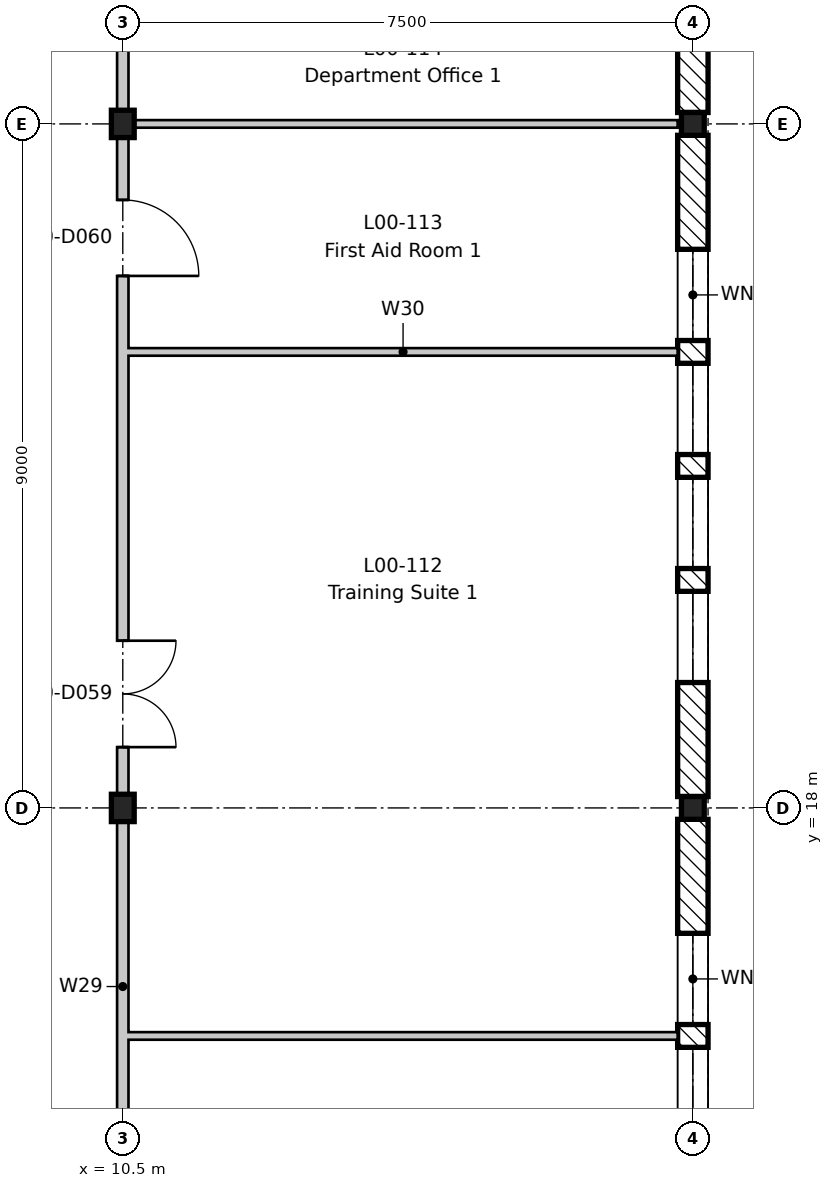
"""IFC4 building model, lengths in metres.
Left out: names, types, materials, properties, quantities, classifications, styles, units other than length and angle.
Written with IfcOpenShell. Run it as: python <this file> out.ifc"""

import sys

from ifc_helpers import new_model, si_unit, direction, frame, frame_2d, origin, origin_2d, place, context, subcontext, project, spatial, rectangle, i_section, extrude, element, fill, save


model = new_model("IFC4")
c1 = context("Model", 3, precision=1e-05, world=origin(), true_north=direction((0.0, 1.0)))
c2 = subcontext(c1, "Body", "Model", "MODEL_VIEW")
j1 = project(units=[si_unit("LENGTHUNIT", "METRE"), si_unit("PLANEANGLEUNIT", "RADIAN")], contexts=[c1])
p1 = place(None, origin())
s1 = spatial("IfcSite", under=j1, at=p1, CompositionType="ELEMENT")
p2 = place(p1, origin())
s2 = spatial("IfcBuilding", under=s1, at=p2, CompositionType="ELEMENT")
p3 = place(p2, origin())
s3 = spatial("IfcBuildingStorey", under=s2, at=p3, CompositionType="ELEMENT", Elevation=0.0)
for number, where, z_axis, x_axis in (
    (1, (10.5, 18.0, -0.6), (0.0, 0.0, 1.0), (1.0, 0.0, 0.0)),
    (2, (10.5, 27.0, -0.6), (0.0, 0.0, 1.0), (1.0, 0.0, 0.0)),
):
    element("IfcColumn", number, at=place(p3, frame(where, z_axis=z_axis, x_axis=x_axis)), inside=s3, PredefinedType="COLUMN", context=c2, shape_type="SweptSolid", body=[
        extrude(i_section(OverallWidth=0.3, OverallDepth=0.36, WebThickness=0.012, FlangeThickness=0.022, FilletRadius=0.027, at=origin_2d()), origin(), (0.0, 0.0, 1.0), 5.8),
    ])
for number, where, z_axis, x_axis in (
    (3, (18.0, 18.0, -0.6), (0.0, 0.0, 1.0), (1.0, 0.0, 0.0)),
    (4, (18.0, 27.0, -0.6), (0.0, 0.0, 1.0), (1.0, 0.0, 0.0)),
):
    element("IfcColumn", number, at=place(p3, frame(where, z_axis=z_axis, x_axis=x_axis)), inside=s3, PredefinedType="COLUMN", context=c2, shape_type="SweptSolid", body=[
        extrude(i_section(OverallWidth=0.3, OverallDepth=0.3, WebThickness=0.011, FlangeThickness=0.019, FilletRadius=0.027, at=origin_2d()), origin(), (0.0, 0.0, 1.0), 5.8),
    ])
p4 = place(p3, frame((18.0, 17.85, 0.0), z_axis=(0.0, 0.0, 1.0), x_axis=(0.0, -1.0, 0.0)))
e5 = element("IfcWall", 5, at=p4, inside=s3, PredefinedType="STANDARD", context=c2, shape_type="SweptSolid", body=[
    extrude(rectangle(XDim=8.7, YDim=0.4, at=frame_2d((4.35, 0.0))), origin(), (0.0, 0.0, 1.0), 4.8),
])
p5 = place(p4, frame((6.0, 0.0, 0.6)))
e6 = element("IfcOpeningElement", 6, at=p5, cuts=e5, PredefinedType="OPENING", context=c2, shape_type="SweptSolid", body=[
    extrude(rectangle(XDim=1.2, YDim=3.9, at=frame_2d((0.6, 1.95))), frame((0.0, 0.21, 0.0), z_axis=(0.0, -1.0, 0.0), x_axis=(1.0, 0.0, 0.0)), (0.0, 0.0, 1.0), 0.42),
])
p6 = place(p4, frame((4.5, 0.0, 0.6)))
e7 = element("IfcOpeningElement", 7, at=p6, cuts=e5, PredefinedType="OPENING", context=c2, shape_type="SweptSolid", body=[
    extrude(rectangle(XDim=1.2, YDim=3.9, at=frame_2d((0.6, 1.95))), frame((0.0, 0.21, 0.0), z_axis=(0.0, -1.0, 0.0), x_axis=(1.0, 0.0, 0.0)), (0.0, 0.0, 1.0), 0.42),
])
p7 = place(p4, frame((3.0, 0.0, 0.6)))
e8 = element("IfcOpeningElement", 8, at=p7, cuts=e5, PredefinedType="OPENING", context=c2, shape_type="SweptSolid", body=[
    extrude(rectangle(XDim=1.2, YDim=3.9, at=frame_2d((0.6, 1.95))), frame((0.0, 0.21, 0.0), z_axis=(0.0, -1.0, 0.0), x_axis=(1.0, 0.0, 0.0)), (0.0, 0.0, 1.0), 0.42),
])
p8 = place(p4, frame((1.5, 0.0, 0.6)))
e9 = element("IfcOpeningElement", 9, at=p8, cuts=e5, PredefinedType="OPENING", context=c2, shape_type="SweptSolid", body=[
    extrude(rectangle(XDim=1.2, YDim=3.9, at=frame_2d((0.6, 1.95))), frame((0.0, 0.21, 0.0), z_axis=(0.0, -1.0, 0.0), x_axis=(1.0, 0.0, 0.0)), (0.0, 0.0, 1.0), 0.42),
])
p9 = place(p3, frame((18.0, 26.85, 0.0), z_axis=(0.0, 0.0, 1.0), x_axis=(0.0, -1.0, 0.0)))
e10 = element("IfcWall", 10, at=p9, inside=s3, PredefinedType="STANDARD", context=c2, shape_type="SweptSolid", body=[
    extrude(rectangle(XDim=8.7, YDim=0.4, at=frame_2d((4.35, 0.0))), origin(), (0.0, 0.0, 1.0), 4.8),
])
p10 = place(p9, frame((6.0, 0.0, 0.6)))
e11 = element("IfcOpeningElement", 11, at=p10, cuts=e10, PredefinedType="OPENING", context=c2, shape_type="SweptSolid", body=[
    extrude(rectangle(XDim=1.2, YDim=3.9, at=frame_2d((0.6, 1.95))), frame((0.0, 0.21, 0.0), z_axis=(0.0, -1.0, 0.0), x_axis=(1.0, 0.0, 0.0)), (0.0, 0.0, 1.0), 0.42),
])
p11 = place(p9, frame((4.5, 0.0, 0.6)))
e12 = element("IfcOpeningElement", 12, at=p11, cuts=e10, PredefinedType="OPENING", context=c2, shape_type="SweptSolid", body=[
    extrude(rectangle(XDim=1.2, YDim=3.9, at=frame_2d((0.6, 1.95))), frame((0.0, 0.21, 0.0), z_axis=(0.0, -1.0, 0.0), x_axis=(1.0, 0.0, 0.0)), (0.0, 0.0, 1.0), 0.42),
])
p12 = place(p9, frame((3.0, 0.0, 0.6)))
e13 = element("IfcOpeningElement", 13, at=p12, cuts=e10, PredefinedType="OPENING", context=c2, shape_type="SweptSolid", body=[
    extrude(rectangle(XDim=1.2, YDim=3.9, at=frame_2d((0.6, 1.95))), frame((0.0, 0.21, 0.0), z_axis=(0.0, -1.0, 0.0), x_axis=(1.0, 0.0, 0.0)), (0.0, 0.0, 1.0), 0.42),
])
p13 = place(p9, frame((1.5, 0.0, 0.6)))
e14 = element("IfcOpeningElement", 14, at=p13, cuts=e10, PredefinedType="OPENING", context=c2, shape_type="SweptSolid", body=[
    extrude(rectangle(XDim=1.2, YDim=3.9, at=frame_2d((0.6, 1.95))), frame((0.0, 0.21, 0.0), z_axis=(0.0, -1.0, 0.0), x_axis=(1.0, 0.0, 0.0)), (0.0, 0.0, 1.0), 0.42),
])
p14 = place(p3, frame((18.0, 35.85, 0.0), z_axis=(0.0, 0.0, 1.0), x_axis=(0.0, -1.0, 0.0)))
e15 = element("IfcWall", 15, at=p14, inside=s3, PredefinedType="STANDARD", context=c2, shape_type="SweptSolid", body=[
    extrude(rectangle(XDim=8.7, YDim=0.4, at=frame_2d((4.35, 0.0))), origin(), (0.0, 0.0, 1.0), 4.8),
])
for number, where, z_axis, x_axis in (
    (16, (10.575, 15.0, 0.0), (0.0, 0.0, 1.0), (1.0, 0.0, 0.0)),
    (17, (10.575, 24.0, 0.0), (0.0, 0.0, 1.0), (1.0, 0.0, 0.0)),
):
    element("IfcWall", number, at=place(p3, frame(where, z_axis=z_axis, x_axis=x_axis)), inside=s3, PredefinedType="PARTITIONING", context=c2, shape_type="SweptSolid", body=[
        extrude(rectangle(XDim=7.225, YDim=0.1, at=frame_2d((3.613, 0.0))), origin(), (0.0, 0.0, 1.0), 5.2),
    ])
p15 = place(p3, frame((10.575, 27.0, 0.0), z_axis=(0.0, 0.0, 1.0), x_axis=(1.0, 0.0, 0.0)))
e18 = element("IfcWall", 18, at=p15, inside=s3, PredefinedType="PARTITIONING", context=c2, shape_type="SweptSolid", body=[
    extrude(rectangle(XDim=7.225, YDim=0.1, at=frame_2d((3.613, 0.0))), origin(), (0.0, 0.0, 1.0), 4.85),
])
p16 = place(p3, frame((10.5, 0.0, 0.0), z_axis=(0.0, 0.0, 1.0), x_axis=(0.0, 1.0, 0.0)))
e19 = element("IfcWall", 19, at=p16, inside=s3, PredefinedType="PARTITIONING", context=c2, shape_type="SweptSolid", body=[
    extrude(rectangle(XDim=70.5, YDim=0.15, at=frame_2d((35.25, 0.0))), origin(), (0.0, 0.0, 1.0), 4.68),
])
p17 = place(p16, frame((1.0, 0.0, 0.0)))
e20 = element("IfcOpeningElement", 20, at=p17, cuts=e19, PredefinedType="OPENING", context=c2, shape_type="SweptSolid", body=[
    extrude(rectangle(XDim=1.0, YDim=2.1, at=frame_2d((0.5, 1.05))), frame((0.0, 0.085, 0.0), z_axis=(0.0, -1.0, 0.0), x_axis=(1.0, 0.0, 0.0)), (0.0, 0.0, 1.0), 0.17),
])
p18 = place(p16, frame((5.5, 0.0, 0.0)))
e21 = element("IfcOpeningElement", 21, at=p18, cuts=e19, PredefinedType="OPENING", context=c2, shape_type="SweptSolid", body=[
    extrude(rectangle(XDim=1.0, YDim=2.1, at=frame_2d((0.5, 1.05))), frame((0.0, 0.085, 0.0), z_axis=(0.0, -1.0, 0.0), x_axis=(1.0, 0.0, 0.0)), (0.0, 0.0, 1.0), 0.17),
])
p19 = place(p16, frame((11.5, 0.0, 0.0)))
e22 = element("IfcOpeningElement", 22, at=p19, cuts=e19, PredefinedType="OPENING", context=c2, shape_type="SweptSolid", body=[
    extrude(rectangle(XDim=1.0, YDim=2.1, at=frame_2d((0.5, 1.05))), frame((0.0, 0.085, 0.0), z_axis=(0.0, -1.0, 0.0), x_axis=(1.0, 0.0, 0.0)), (0.0, 0.0, 1.0), 0.17),
])
p20 = place(p16, frame((18.8, 0.0, 0.0)))
e23 = element("IfcOpeningElement", 23, at=p20, cuts=e19, PredefinedType="OPENING", context=c2, shape_type="SweptSolid", body=[
    extrude(rectangle(XDim=1.4, YDim=2.1, at=frame_2d((0.7, 1.05))), frame((0.0, 0.085, 0.0), z_axis=(0.0, -1.0, 0.0), x_axis=(1.0, 0.0, 0.0)), (0.0, 0.0, 1.0), 0.17),
])
p21 = place(p16, frame((25.0, 0.0, 0.0)))
e24 = element("IfcOpeningElement", 24, at=p21, cuts=e19, PredefinedType="OPENING", context=c2, shape_type="SweptSolid", body=[
    extrude(rectangle(XDim=1.0, YDim=2.1, at=frame_2d((0.5, 1.05))), frame((0.0, 0.085, 0.0), z_axis=(0.0, -1.0, 0.0), x_axis=(1.0, 0.0, 0.0)), (0.0, 0.0, 1.0), 0.17),
])
p22 = place(p16, frame((28.0, 0.0, 0.0)))
e25 = element("IfcOpeningElement", 25, at=p22, cuts=e19, PredefinedType="OPENING", context=c2, shape_type="SweptSolid", body=[
    extrude(rectangle(XDim=1.0, YDim=2.1, at=frame_2d((0.5, 1.05))), frame((0.0, 0.085, 0.0), z_axis=(0.0, -1.0, 0.0), x_axis=(1.0, 0.0, 0.0)), (0.0, 0.0, 1.0), 0.17),
])
p23 = place(p16, frame((33.8, 0.0, 0.0)))
e26 = element("IfcOpeningElement", 26, at=p23, cuts=e19, PredefinedType="OPENING", context=c2, shape_type="SweptSolid", body=[
    extrude(rectangle(XDim=1.4, YDim=2.1, at=frame_2d((0.7, 1.05))), frame((0.0, 0.085, 0.0), z_axis=(0.0, -1.0, 0.0), x_axis=(1.0, 0.0, 0.0)), (0.0, 0.0, 1.0), 0.17),
])
p24 = place(p16, frame((41.5, 0.0, 0.0)))
e27 = element("IfcOpeningElement", 27, at=p24, cuts=e19, PredefinedType="OPENING", context=c2, shape_type="SweptSolid", body=[
    extrude(rectangle(XDim=1.0, YDim=2.1, at=frame_2d((0.5, 1.05))), frame((0.0, 0.085, 0.0), z_axis=(0.0, -1.0, 0.0), x_axis=(1.0, 0.0, 0.0)), (0.0, 0.0, 1.0), 0.17),
])
p25 = place(p16, frame((46.0, 0.0, 0.0)))
e28 = element("IfcOpeningElement", 28, at=p25, cuts=e19, PredefinedType="OPENING", context=c2, shape_type="SweptSolid", body=[
    extrude(rectangle(XDim=1.0, YDim=2.1, at=frame_2d((0.5, 1.05))), frame((0.0, 0.085, 0.0), z_axis=(0.0, -1.0, 0.0), x_axis=(1.0, 0.0, 0.0)), (0.0, 0.0, 1.0), 0.17),
])
p26 = place(p16, frame((49.0, 0.0, 0.0)))
e29 = element("IfcOpeningElement", 29, at=p26, cuts=e19, PredefinedType="OPENING", context=c2, shape_type="SweptSolid", body=[
    extrude(rectangle(XDim=1.0, YDim=2.1, at=frame_2d((0.5, 1.05))), frame((0.0, 0.085, 0.0), z_axis=(0.0, -1.0, 0.0), x_axis=(1.0, 0.0, 0.0)), (0.0, 0.0, 1.0), 0.17),
])
p27 = place(p16, frame((54.75, 0.0, 0.0)))
e30 = element("IfcOpeningElement", 30, at=p27, cuts=e19, PredefinedType="OPENING", context=c2, shape_type="SweptSolid", body=[
    extrude(rectangle(XDim=1.0, YDim=2.1, at=frame_2d((0.5, 1.05))), frame((0.0, 0.085, 0.0), z_axis=(0.0, -1.0, 0.0), x_axis=(1.0, 0.0, 0.0)), (0.0, 0.0, 1.0), 0.17),
])
p28 = place(p16, frame((58.0, 0.0, 0.0)))
e31 = element("IfcOpeningElement", 31, at=p28, cuts=e19, PredefinedType="OPENING", context=c2, shape_type="SweptSolid", body=[
    extrude(rectangle(XDim=1.0, YDim=2.1, at=frame_2d((0.5, 1.05))), frame((0.0, 0.085, 0.0), z_axis=(0.0, -1.0, 0.0), x_axis=(1.0, 0.0, 0.0)), (0.0, 0.0, 1.0), 0.17),
])
p29 = place(p16, frame((61.0, 0.0, 0.0)))
e32 = element("IfcOpeningElement", 32, at=p29, cuts=e19, PredefinedType="OPENING", context=c2, shape_type="SweptSolid", body=[
    extrude(rectangle(XDim=1.0, YDim=2.1, at=frame_2d((0.5, 1.05))), frame((0.0, 0.085, 0.0), z_axis=(0.0, -1.0, 0.0), x_axis=(1.0, 0.0, 0.0)), (0.0, 0.0, 1.0), 0.17),
])
p30 = place(p16, frame((64.0, 0.0, 0.0)))
e33 = element("IfcOpeningElement", 33, at=p30, cuts=e19, PredefinedType="OPENING", context=c2, shape_type="SweptSolid", body=[
    extrude(rectangle(XDim=1.0, YDim=2.1, at=frame_2d((0.5, 1.05))), frame((0.0, 0.085, 0.0), z_axis=(0.0, -1.0, 0.0), x_axis=(1.0, 0.0, 0.0)), (0.0, 0.0, 1.0), 0.17),
])
p31 = place(p7, origin())
e34 = element("IfcWindow", 34, at=p31, inside=s3, PartitioningType="SINGLE_PANEL", PredefinedType="WINDOW", context=c2, shape_type="SweptSolid", body=[
    extrude(rectangle(XDim=1.2, YDim=3.9, at=frame_2d((0.6, 1.95))), frame((0.0, 0.03, 0.0), z_axis=(0.0, -1.0, 0.0), x_axis=(1.0, 0.0, 0.0)), (0.0, 0.0, 1.0), 0.06),
])
fill(e8, e34)
p32 = place(p8, origin())
e35 = element("IfcWindow", 35, at=p32, inside=s3, PartitioningType="SINGLE_PANEL", PredefinedType="WINDOW", context=c2, shape_type="SweptSolid", body=[
    extrude(rectangle(XDim=1.2, YDim=3.9, at=frame_2d((0.6, 1.95))), frame((0.0, 0.03, 0.0), z_axis=(0.0, -1.0, 0.0), x_axis=(1.0, 0.0, 0.0)), (0.0, 0.0, 1.0), 0.06),
])
fill(e9, e35)
p33 = place(p10, origin())
e36 = element("IfcWindow", 36, at=p33, inside=s3, PartitioningType="SINGLE_PANEL", PredefinedType="WINDOW", context=c2, shape_type="SweptSolid", body=[
    extrude(rectangle(XDim=1.2, YDim=3.9, at=frame_2d((0.6, 1.95))), frame((0.0, 0.03, 0.0), z_axis=(0.0, -1.0, 0.0), x_axis=(1.0, 0.0, 0.0)), (0.0, 0.0, 1.0), 0.06),
])
fill(e11, e36)
p34 = place(p11, origin())
e37 = element("IfcWindow", 37, at=p34, inside=s3, PartitioningType="SINGLE_PANEL", PredefinedType="WINDOW", context=c2, shape_type="SweptSolid", body=[
    extrude(rectangle(XDim=1.2, YDim=3.9, at=frame_2d((0.6, 1.95))), frame((0.0, 0.03, 0.0), z_axis=(0.0, -1.0, 0.0), x_axis=(1.0, 0.0, 0.0)), (0.0, 0.0, 1.0), 0.06),
])
fill(e12, e37)
p35 = place(p12, origin())
e38 = element("IfcWindow", 38, at=p35, inside=s3, PartitioningType="SINGLE_PANEL", PredefinedType="WINDOW", context=c2, shape_type="SweptSolid", body=[
    extrude(rectangle(XDim=1.2, YDim=3.9, at=frame_2d((0.6, 1.95))), frame((0.0, 0.03, 0.0), z_axis=(0.0, -1.0, 0.0), x_axis=(1.0, 0.0, 0.0)), (0.0, 0.0, 1.0), 0.06),
])
fill(e13, e38)
p36 = place(p13, origin())
e39 = element("IfcWindow", 39, at=p36, inside=s3, PartitioningType="SINGLE_PANEL", PredefinedType="WINDOW", context=c2, shape_type="SweptSolid", body=[
    extrude(rectangle(XDim=1.2, YDim=3.9, at=frame_2d((0.6, 1.95))), frame((0.0, 0.03, 0.0), z_axis=(0.0, -1.0, 0.0), x_axis=(1.0, 0.0, 0.0)), (0.0, 0.0, 1.0), 0.06),
])
fill(e14, e39)
p37 = place(p20, frame((1.4, 0.0, 0.0), z_axis=(0.0, 0.0, 1.0), x_axis=(-1.0, 0.0, 0.0)))
e40 = element("IfcDoor", 40, at=p37, inside=s3, OperationType="DOUBLE_DOOR_SINGLE_SWING", PredefinedType="DOOR", context=c2, shape_type="SweptSolid", body=[
    extrude(rectangle(XDim=1.4, YDim=2.1, at=frame_2d((0.7, 1.05))), frame((0.0, 0.025, 0.0), z_axis=(0.0, -1.0, 0.0), x_axis=(1.0, 0.0, 0.0)), (0.0, 0.0, 1.0), 0.05),
])
fill(e23, e40)
p38 = place(p21, frame((1.0, 0.0, 0.0), z_axis=(0.0, 0.0, 1.0), x_axis=(-1.0, 0.0, 0.0)))
e41 = element("IfcDoor", 41, at=p38, inside=s3, OperationType="SINGLE_SWING_RIGHT", PredefinedType="DOOR", context=c2, shape_type="SweptSolid", body=[
    extrude(rectangle(XDim=1.0, YDim=2.1, at=frame_2d((0.5, 1.05))), frame((0.0, 0.025, 0.0), z_axis=(0.0, -1.0, 0.0), x_axis=(1.0, 0.0, 0.0)), (0.0, 0.0, 1.0), 0.05),
])
fill(e24, e41)
save(model, sys.argv[1])
